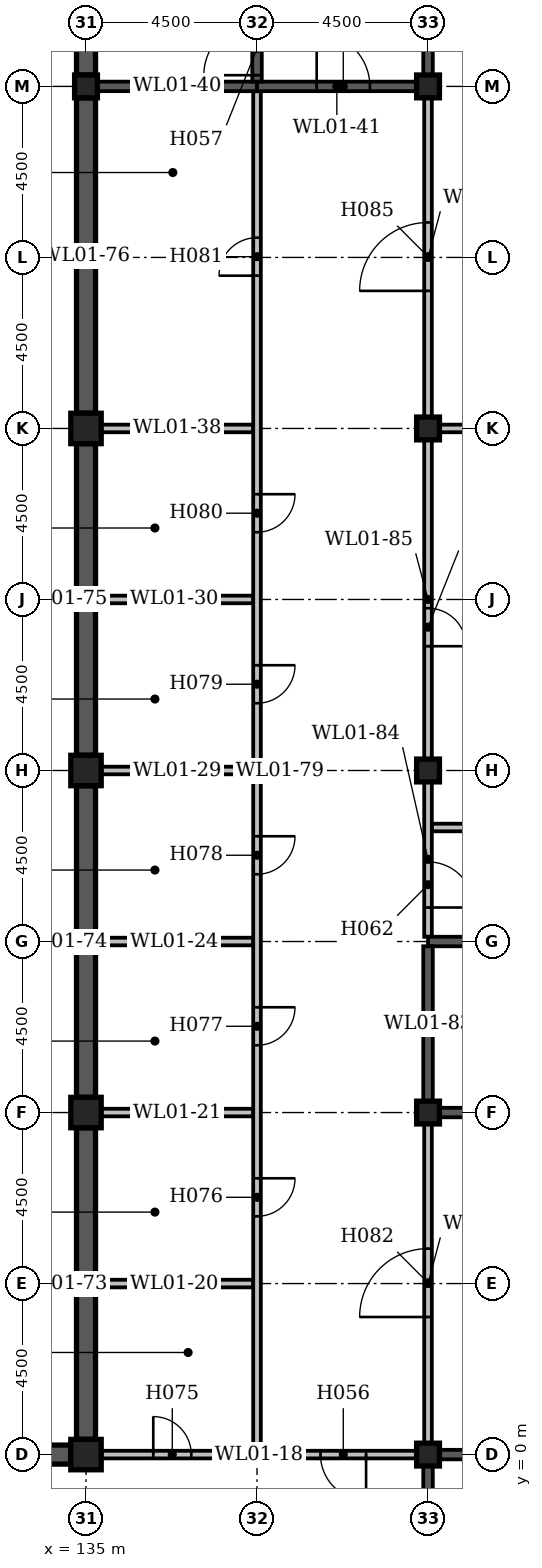
"""IFC4 building model, lengths in metres.
Left out: names, types, materials, properties, quantities, classifications, styles, units other than length and angle.
Written with IfcOpenShell. Run it as: python <this file> out.ifc"""

import sys

from ifc_helpers import new_model, si_unit, direction, frame, frame_2d, origin, origin_2d, place, context, subcontext, project, spatial, rectangle, extrude, element, fill, save


model = new_model("IFC4")
c1 = context("Model", 3, precision=1e-05, world=origin(), true_north=direction((0.0, 1.0)))
c2 = subcontext(c1, "Body", "Model", "MODEL_VIEW")
j1 = project(units=[si_unit("LENGTHUNIT", "METRE"), si_unit("PLANEANGLEUNIT", "RADIAN")], contexts=[c1])
p1 = place(None, origin())
s1 = spatial("IfcSite", under=j1, at=p1, CompositionType="ELEMENT")
p2 = place(p1, origin())
s2 = spatial("IfcBuilding", under=s1, at=p2, CompositionType="ELEMENT")
p3 = place(p2, frame((0.0, 0.0, 9.0)))
s3 = spatial("IfcBuildingStorey", under=s2, at=p3, CompositionType="ELEMENT", Elevation=9.0)
for number, where, z_axis, x_axis in (
    (1, (135.0, 0.0, -0.3), (0.0, 0.0, 1.0), (1.0, 0.0, 0.0)),
    (2, (135.0, 9.0, -0.3), (0.0, 0.0, 1.0), (1.0, 0.0, 0.0)),
    (3, (135.0, 18.0, -0.3), (0.0, 0.0, 1.0), (1.0, 0.0, 0.0)),
    (4, (135.0, 27.0, -0.3), (0.0, 0.0, 1.0), (1.0, 0.0, 0.0)),
):
    element("IfcColumn", number, at=place(p3, frame(where, z_axis=z_axis, x_axis=x_axis)), inside=s3, PredefinedType="COLUMN", context=c2, shape_type="SweptSolid", body=[
        extrude(rectangle(XDim=0.8, YDim=0.8, at=origin_2d()), origin(), (0.0, 0.0, 1.0), 5.0),
    ])
p4 = place(p3, frame((135.0, 36.0, -0.3), z_axis=(0.0, 0.0, 1.0), x_axis=(1.0, 0.0, 0.0)))
e5 = element("IfcColumn", 5, at=p4, inside=s3, PredefinedType="COLUMN", context=c2, shape_type="SweptSolid", body=[
    extrude(rectangle(XDim=0.6, YDim=0.6, at=origin_2d()), origin(), (0.0, 0.0, 1.0), 5.0),
])
for number, where, z_axis, x_axis in (
    (6, (144.0, 0.0, 0.0), (0.0, 0.0, 1.0), (1.0, 0.0, 0.0)),
    (7, (144.0, 9.0, 0.0), (0.0, 0.0, 1.0), (1.0, 0.0, 0.0)),
    (8, (144.0, 18.0, 0.0), (0.0, 0.0, 1.0), (1.0, 0.0, 0.0)),
    (9, (144.0, 27.0, 0.0), (0.0, 0.0, 1.0), (1.0, 0.0, 0.0)),
    (10, (144.0, 36.0, 0.0), (0.0, 0.0, 1.0), (1.0, 0.0, 0.0)),
):
    element("IfcColumn", number, at=place(p3, frame(where, z_axis=z_axis, x_axis=x_axis)), inside=s3, PredefinedType="COLUMN", context=c2, shape_type="SweptSolid", body=[
        extrude(rectangle(XDim=0.6, YDim=0.6, at=origin_2d()), origin(), (0.0, 0.0, 1.0), 4.7),
    ])
p5 = place(p3, frame((126.3, 0.0, 0.0), z_axis=(0.0, 0.0, 1.0), x_axis=(1.0, 0.0, 0.0)))
e11 = element("IfcWall", 11, at=p5, inside=s3, PredefinedType="STANDARD", context=c2, shape_type="SweptSolid", body=[
    extrude(rectangle(XDim=8.3, YDim=0.5, at=frame_2d((4.15, 0.0))), origin(), (0.0, 0.0, 1.0), 5.0),
])
p6 = place(p3, frame((135.4, 0.0, 0.0), z_axis=(0.0, 0.0, 1.0), x_axis=(1.0, 0.0, 0.0)))
e12 = element("IfcWall", 12, at=p6, inside=s3, PredefinedType="STANDARD", context=c2, shape_type="SweptSolid", body=[
    extrude(rectangle(XDim=8.3, YDim=0.2, at=frame_2d((4.15, 0.0))), origin(), (0.0, 0.0, 1.0), 4.7),
])
p7 = place(p6, frame((5.77, 0.0, 0.0)))
e13 = element("IfcOpeningElement", 13, at=p7, cuts=e12, PredefinedType="OPENING", context=c2, shape_type="SweptSolid", body=[
    extrude(rectangle(XDim=1.2, YDim=2.1, at=frame_2d((0.6, 1.05))), frame((0.0, 0.112, 0.0), z_axis=(0.0, -1.0, 0.0), x_axis=(1.0, 0.0, 0.0)), (0.0, 0.0, 1.0), 0.224),
])
p8 = place(p6, frame((1.37, 0.0, 0.0)))
e14 = element("IfcOpeningElement", 14, at=p8, cuts=e12, PredefinedType="OPENING", context=c2, shape_type="SweptSolid", body=[
    extrude(rectangle(XDim=1.0, YDim=2.1, at=frame_2d((0.5, 1.05))), frame((0.0, 0.112, 0.0), z_axis=(0.0, -1.0, 0.0), x_axis=(1.0, 0.0, 0.0)), (0.0, 0.0, 1.0), 0.224),
])
p9 = place(p3, frame((144.3, 0.0, 0.0), z_axis=(0.0, 0.0, 1.0), x_axis=(1.0, 0.0, 0.0)))
e15 = element("IfcWall", 15, at=p9, inside=s3, PredefinedType="STANDARD", context=c2, shape_type="SweptSolid", body=[
    extrude(rectangle(XDim=4.2, YDim=0.25, at=frame_2d((2.1, 0.0))), origin(), (0.0, 0.0, 1.0), 5.0),
])
p10 = place(p3, frame((135.25, 4.5, 0.0), z_axis=(0.0, 0.0, 1.0), x_axis=(1.0, 0.0, 0.0)))
e16 = element("IfcWall", 16, at=p10, inside=s3, PredefinedType="STANDARD", context=c2, shape_type="SweptSolid", body=[
    extrude(rectangle(XDim=4.15, YDim=0.2, at=frame_2d((2.075, 0.0))), origin(), (0.0, 0.0, 1.0), 4.7),
])
p11 = place(p3, frame((135.4, 9.0, 0.0), z_axis=(0.0, 0.0, 1.0), x_axis=(1.0, 0.0, 0.0)))
e17 = element("IfcWall", 17, at=p11, inside=s3, PredefinedType="STANDARD", context=c2, shape_type="SweptSolid", body=[
    extrude(rectangle(XDim=4.0, YDim=0.2, at=frame_2d((2.0, 0.0))), origin(), (0.0, 0.0, 1.0), 4.7),
])
p12 = place(p3, frame((144.3, 9.0, 0.0), z_axis=(0.0, 0.0, 1.0), x_axis=(1.0, 0.0, 0.0)))
e18 = element("IfcWall", 18, at=p12, inside=s3, PredefinedType="STANDARD", context=c2, shape_type="SweptSolid", body=[
    extrude(rectangle(XDim=4.2, YDim=0.25, at=frame_2d((2.1, 0.0))), origin(), (0.0, 0.0, 1.0), 5.0),
])
p13 = place(p3, frame((135.25, 13.5, 0.0), z_axis=(0.0, 0.0, 1.0), x_axis=(1.0, 0.0, 0.0)))
e19 = element("IfcWall", 19, at=p13, inside=s3, PredefinedType="STANDARD", context=c2, shape_type="SweptSolid", body=[
    extrude(rectangle(XDim=4.15, YDim=0.2, at=frame_2d((2.075, 0.0))), origin(), (0.0, 0.0, 1.0), 4.7),
])
p14 = place(p3, frame((144.0, 13.5, 0.0), z_axis=(0.0, 0.0, 1.0), x_axis=(1.0, 0.0, 0.0)))
e20 = element("IfcWall", 20, at=p14, inside=s3, PredefinedType="STANDARD", context=c2, shape_type="SweptSolid", body=[
    extrude(rectangle(XDim=4.5, YDim=0.25, at=frame_2d((2.25, 0.0))), origin(), (0.0, 0.0, 1.0), 5.0),
])
p15 = place(p14, frame((1.72, 0.0, 0.0)))
e21 = element("IfcOpeningElement", 21, at=p15, cuts=e20, PredefinedType="OPENING", context=c2, shape_type="SweptSolid", body=[
    extrude(rectangle(XDim=1.1, YDim=2.1, at=frame_2d((0.55, 1.05))), frame((0.0, 0.137, 0.0), z_axis=(0.0, -1.0, 0.0), x_axis=(1.0, 0.0, 0.0)), (0.0, 0.0, 1.0), 0.274),
])
p16 = place(p3, frame((144.1, 16.5, 0.0), z_axis=(0.0, 0.0, 1.0), x_axis=(1.0, 0.0, 0.0)))
e22 = element("IfcWall", 22, at=p16, inside=s3, PredefinedType="STANDARD", context=c2, shape_type="SweptSolid", body=[
    extrude(rectangle(XDim=8.725, YDim=0.2, at=frame_2d((4.362, 0.0))), origin(), (0.0, 0.0, 1.0), 4.7),
])
p17 = place(p3, frame((135.4, 18.0, 0.0), z_axis=(0.0, 0.0, 1.0), x_axis=(1.0, 0.0, 0.0)))
e23 = element("IfcWall", 23, at=p17, inside=s3, PredefinedType="STANDARD", context=c2, shape_type="SweptSolid", body=[
    extrude(rectangle(XDim=4.0, YDim=0.2, at=frame_2d((2.0, 0.0))), origin(), (0.0, 0.0, 1.0), 4.7),
])
p18 = place(p3, frame((135.25, 22.5, 0.0), z_axis=(0.0, 0.0, 1.0), x_axis=(1.0, 0.0, 0.0)))
e24 = element("IfcWall", 24, at=p18, inside=s3, PredefinedType="STANDARD", context=c2, shape_type="SweptSolid", body=[
    extrude(rectangle(XDim=4.15, YDim=0.2, at=frame_2d((2.075, 0.0))), origin(), (0.0, 0.0, 1.0), 4.7),
])
p19 = place(p3, frame((135.4, 27.0, 0.0), z_axis=(0.0, 0.0, 1.0), x_axis=(1.0, 0.0, 0.0)))
e25 = element("IfcWall", 25, at=p19, inside=s3, PredefinedType="STANDARD", context=c2, shape_type="SweptSolid", body=[
    extrude(rectangle(XDim=4.0, YDim=0.2, at=frame_2d((2.0, 0.0))), origin(), (0.0, 0.0, 1.0), 4.7),
])
p20 = place(p3, frame((144.3, 27.0, 0.0), z_axis=(0.0, 0.0, 1.0), x_axis=(1.0, 0.0, 0.0)))
e26 = element("IfcWall", 26, at=p20, inside=s3, PredefinedType="STANDARD", context=c2, shape_type="SweptSolid", body=[
    extrude(rectangle(XDim=8.4, YDim=0.2, at=frame_2d((4.2, 0.0))), origin(), (0.0, 0.0, 1.0), 4.7),
])
p21 = place(p3, frame((135.3, 36.0, 0.0), z_axis=(0.0, 0.0, 1.0), x_axis=(1.0, 0.0, 0.0)))
e27 = element("IfcWall", 27, at=p21, inside=s3, PredefinedType="STANDARD", context=c2, shape_type="SweptSolid", body=[
    extrude(rectangle(XDim=4.2, YDim=0.25, at=frame_2d((2.1, 0.0))), origin(), (0.0, 0.0, 1.0), 5.0),
])
p22 = place(p3, frame((139.5, 36.0, 0.0), z_axis=(0.0, 0.0, 1.0), x_axis=(1.0, 0.0, 0.0)))
e28 = element("IfcWall", 28, at=p22, inside=s3, PredefinedType="STANDARD", context=c2, shape_type="SweptSolid", body=[
    extrude(rectangle(XDim=4.2, YDim=0.25, at=frame_2d((2.1, 0.0))), origin(), (0.0, 0.0, 1.0), 4.7),
])
p23 = place(p22, frame((1.57, 0.0, 0.0)))
e29 = element("IfcOpeningElement", 29, at=p23, cuts=e28, PredefinedType="OPENING", context=c2, shape_type="SweptSolid", body=[
    extrude(rectangle(XDim=1.4, YDim=2.1, at=frame_2d((0.7, 1.05))), frame((0.0, 0.137, 0.0), z_axis=(0.0, -1.0, 0.0), x_axis=(1.0, 0.0, 0.0)), (0.0, 0.0, 1.0), 0.274),
])
for number, where, z_axis, x_axis in (
    (30, (135.0, 0.4, 0.0), (0.0, 0.0, 1.0), (0.0, 1.0, 0.0)),
    (31, (135.0, 9.4, 0.0), (0.0, 0.0, 1.0), (0.0, 1.0, 0.0)),
    (32, (135.0, 18.4, 0.0), (0.0, 0.0, 1.0), (0.0, 1.0, 0.0)),
):
    element("IfcWall", number, at=place(p3, frame(where, z_axis=z_axis, x_axis=x_axis)), inside=s3, PredefinedType="STANDARD", context=c2, shape_type="SweptSolid", body=[
        extrude(rectangle(XDim=8.2, YDim=0.5, at=frame_2d((4.1, 0.0))), origin(), (0.0, 0.0, 1.0), 5.0),
    ])
for number, where, z_axis, x_axis in (
    (33, (135.0, 27.4, 0.0), (0.0, 0.0, 1.0), (0.0, 1.0, 0.0)),
    (34, (135.0, 36.3, 0.0), (0.0, 0.0, 1.0), (0.0, 1.0, 0.0)),
):
    element("IfcWall", number, at=place(p3, frame(where, z_axis=z_axis, x_axis=x_axis)), inside=s3, PredefinedType="STANDARD", context=c2, shape_type="SweptSolid", body=[
        extrude(rectangle(XDim=8.3, YDim=0.5, at=frame_2d((4.15, 0.0))), origin(), (0.0, 0.0, 1.0), 5.0),
    ])
p24 = place(p3, frame((139.5, 0.1, 0.0), z_axis=(0.0, 0.0, 1.0), x_axis=(0.0, 1.0, 0.0)))
e35 = element("IfcWall", 35, at=p24, inside=s3, PredefinedType="STANDARD", context=c2, shape_type="SweptSolid", body=[
    extrude(rectangle(XDim=35.775, YDim=0.2, at=frame_2d((17.887, 0.0))), origin(), (0.0, 0.0, 1.0), 4.7),
])
p25 = place(p24, frame((6.17, 0.0, 0.0)))
e36 = element("IfcOpeningElement", 36, at=p25, cuts=e35, PredefinedType="OPENING", context=c2, shape_type="SweptSolid", body=[
    extrude(rectangle(XDim=1.0, YDim=2.1, at=frame_2d((0.5, 1.05))), frame((0.0, 0.112, 0.0), z_axis=(0.0, -1.0, 0.0), x_axis=(1.0, 0.0, 0.0)), (0.0, 0.0, 1.0), 0.224),
])
p26 = place(p24, frame((10.67, 0.0, 0.0)))
e37 = element("IfcOpeningElement", 37, at=p26, cuts=e35, PredefinedType="OPENING", context=c2, shape_type="SweptSolid", body=[
    extrude(rectangle(XDim=1.0, YDim=2.1, at=frame_2d((0.5, 1.05))), frame((0.0, 0.112, 0.0), z_axis=(0.0, -1.0, 0.0), x_axis=(1.0, 0.0, 0.0)), (0.0, 0.0, 1.0), 0.224),
])
p27 = place(p24, frame((15.17, 0.0, 0.0)))
e38 = element("IfcOpeningElement", 38, at=p27, cuts=e35, PredefinedType="OPENING", context=c2, shape_type="SweptSolid", body=[
    extrude(rectangle(XDim=1.0, YDim=2.1, at=frame_2d((0.5, 1.05))), frame((0.0, 0.112, 0.0), z_axis=(0.0, -1.0, 0.0), x_axis=(1.0, 0.0, 0.0)), (0.0, 0.0, 1.0), 0.224),
])
p28 = place(p24, frame((19.67, 0.0, 0.0)))
e39 = element("IfcOpeningElement", 39, at=p28, cuts=e35, PredefinedType="OPENING", context=c2, shape_type="SweptSolid", body=[
    extrude(rectangle(XDim=1.0, YDim=2.1, at=frame_2d((0.5, 1.05))), frame((0.0, 0.112, 0.0), z_axis=(0.0, -1.0, 0.0), x_axis=(1.0, 0.0, 0.0)), (0.0, 0.0, 1.0), 0.224),
])
p29 = place(p24, frame((24.17, 0.0, 0.0)))
e40 = element("IfcOpeningElement", 40, at=p29, cuts=e35, PredefinedType="OPENING", context=c2, shape_type="SweptSolid", body=[
    extrude(rectangle(XDim=1.0, YDim=2.1, at=frame_2d((0.5, 1.05))), frame((0.0, 0.112, 0.0), z_axis=(0.0, -1.0, 0.0), x_axis=(1.0, 0.0, 0.0)), (0.0, 0.0, 1.0), 0.224),
])
p30 = place(p24, frame((30.92, 0.0, 0.0)))
e41 = element("IfcOpeningElement", 41, at=p30, cuts=e35, PredefinedType="OPENING", context=c2, shape_type="SweptSolid", body=[
    extrude(rectangle(XDim=1.0, YDim=2.1, at=frame_2d((0.5, 1.05))), frame((0.0, 0.112, 0.0), z_axis=(0.0, -1.0, 0.0), x_axis=(1.0, 0.0, 0.0)), (0.0, 0.0, 1.0), 0.224),
])
p31 = place(p3, frame((139.5, 36.125, 0.0), z_axis=(0.0, 0.0, 1.0), x_axis=(0.0, 1.0, 0.0)))
e42 = element("IfcWall", 42, at=p31, inside=s3, PredefinedType="STANDARD", context=c2, shape_type="SweptSolid", body=[
    extrude(rectangle(XDim=8.7, YDim=0.25, at=frame_2d((4.35, 0.0))), origin(), (0.0, 0.0, 1.0), 5.0),
])
p32 = place(p31, frame((0.17, 0.0, 0.0)))
e43 = element("IfcOpeningElement", 43, at=p32, cuts=e42, PredefinedType="OPENING", context=c2, shape_type="SweptSolid", body=[
    extrude(rectangle(XDim=1.4, YDim=2.1, at=frame_2d((0.7, 1.05))), frame((0.0, 0.137, 0.0), z_axis=(0.0, -1.0, 0.0), x_axis=(1.0, 0.0, 0.0)), (0.0, 0.0, 1.0), 0.274),
])
p33 = place(p3, frame((144.0, -8.7, 0.0), z_axis=(0.0, 0.0, 1.0), x_axis=(0.0, 1.0, 0.0)))
e44 = element("IfcWall", 44, at=p33, inside=s3, PredefinedType="STANDARD", context=c2, shape_type="SweptSolid", body=[
    extrude(rectangle(XDim=8.4, YDim=0.25, at=frame_2d((4.2, 0.0))), origin(), (0.0, 0.0, 1.0), 5.0),
])
p34 = place(p33, frame((0.12, 0.0, 0.0)))
e45 = element("IfcOpeningElement", 45, at=p34, cuts=e44, PredefinedType="OPENING", context=c2, shape_type="SweptSolid", body=[
    extrude(rectangle(XDim=1.2, YDim=2.1, at=frame_2d((0.6, 1.05))), frame((0.0, 0.137, 0.0), z_axis=(0.0, -1.0, 0.0), x_axis=(1.0, 0.0, 0.0)), (0.0, 0.0, 1.0), 0.274),
])
p35 = place(p3, frame((144.0, 0.3, 0.0), z_axis=(0.0, 0.0, 1.0), x_axis=(0.0, 1.0, 0.0)))
e46 = element("IfcWall", 46, at=p35, inside=s3, PredefinedType="STANDARD", context=c2, shape_type="SweptSolid", body=[
    extrude(rectangle(XDim=8.4, YDim=0.2, at=frame_2d((4.2, 0.0))), origin(), (0.0, 0.0, 1.0), 4.7),
])
p36 = place(p35, frame((3.32, 0.0, 0.0)))
e47 = element("IfcOpeningElement", 47, at=p36, cuts=e46, PredefinedType="OPENING", context=c2, shape_type="SweptSolid", body=[
    extrude(rectangle(XDim=1.8, YDim=2.4, at=frame_2d((0.9, 1.2))), frame((0.0, 0.112, 0.0), z_axis=(0.0, -1.0, 0.0), x_axis=(1.0, 0.0, 0.0)), (0.0, 0.0, 1.0), 0.224),
])
p37 = place(p3, frame((144.0, 9.3, 0.0), z_axis=(0.0, 0.0, 1.0), x_axis=(0.0, 1.0, 0.0)))
e48 = element("IfcWall", 48, at=p37, inside=s3, PredefinedType="STANDARD", context=c2, shape_type="SweptSolid", body=[
    extrude(rectangle(XDim=4.075, YDim=0.25, at=frame_2d((2.038, 0.0))), origin(), (0.0, 0.0, 1.0), 5.0),
])
p38 = place(p3, frame((144.0, 13.625, 0.0), z_axis=(0.0, 0.0, 1.0), x_axis=(0.0, 1.0, 0.0)))
e49 = element("IfcWall", 49, at=p38, inside=s3, PredefinedType="STANDARD", context=c2, shape_type="SweptSolid", body=[
    extrude(rectangle(XDim=4.075, YDim=0.2, at=frame_2d((2.038, 0.0))), origin(), (0.0, 0.0, 1.0), 4.7),
])
p39 = place(p38, frame((0.77, 0.0, 0.0)))
e50 = element("IfcOpeningElement", 50, at=p39, cuts=e49, PredefinedType="OPENING", context=c2, shape_type="SweptSolid", body=[
    extrude(rectangle(XDim=1.2, YDim=2.1, at=frame_2d((0.6, 1.05))), frame((0.0, 0.112, 0.0), z_axis=(0.0, -1.0, 0.0), x_axis=(1.0, 0.0, 0.0)), (0.0, 0.0, 1.0), 0.224),
])
p40 = place(p3, frame((144.0, 18.3, 0.0), z_axis=(0.0, 0.0, 1.0), x_axis=(0.0, 1.0, 0.0)))
e51 = element("IfcWall", 51, at=p40, inside=s3, PredefinedType="STANDARD", context=c2, shape_type="SweptSolid", body=[
    extrude(rectangle(XDim=8.4, YDim=0.2, at=frame_2d((4.2, 0.0))), origin(), (0.0, 0.0, 1.0), 4.7),
])
p41 = place(p40, frame((2.97, 0.0, 0.0)))
e52 = element("IfcOpeningElement", 52, at=p41, cuts=e51, PredefinedType="OPENING", context=c2, shape_type="SweptSolid", body=[
    extrude(rectangle(XDim=1.0, YDim=2.1, at=frame_2d((0.5, 1.05))), frame((0.0, 0.112, 0.0), z_axis=(0.0, -1.0, 0.0), x_axis=(1.0, 0.0, 0.0)), (0.0, 0.0, 1.0), 0.224),
])
p42 = place(p3, frame((144.0, 27.3, 0.0), z_axis=(0.0, 0.0, 1.0), x_axis=(0.0, 1.0, 0.0)))
e53 = element("IfcWall", 53, at=p42, inside=s3, PredefinedType="STANDARD", context=c2, shape_type="SweptSolid", body=[
    extrude(rectangle(XDim=8.4, YDim=0.2, at=frame_2d((4.2, 0.0))), origin(), (0.0, 0.0, 1.0), 4.7),
])
p43 = place(p42, frame((3.32, 0.0, 0.0)))
e54 = element("IfcOpeningElement", 54, at=p43, cuts=e53, PredefinedType="OPENING", context=c2, shape_type="SweptSolid", body=[
    extrude(rectangle(XDim=1.8, YDim=2.4, at=frame_2d((0.9, 1.2))), frame((0.0, 0.112, 0.0), z_axis=(0.0, -1.0, 0.0), x_axis=(1.0, 0.0, 0.0)), (0.0, 0.0, 1.0), 0.224),
])
p44 = place(p3, frame((144.0, 36.3, 0.0), z_axis=(0.0, 0.0, 1.0), x_axis=(0.0, 1.0, 0.0)))
e55 = element("IfcWall", 55, at=p44, inside=s3, PredefinedType="STANDARD", context=c2, shape_type="SweptSolid", body=[
    extrude(rectangle(XDim=8.4, YDim=0.25, at=frame_2d((4.2, 0.0))), origin(), (0.0, 0.0, 1.0), 4.7),
])
p45 = place(p7, origin())
e56 = element("IfcDoor", 56, at=p45, inside=s3, OperationType="SINGLE_SWING_RIGHT", PredefinedType="DOOR", context=c2, shape_type="SweptSolid", body=[
    extrude(rectangle(XDim=1.2, YDim=2.1, at=frame_2d((0.6, 1.05))), frame((0.0, 0.025, 0.0), z_axis=(0.0, -1.0, 0.0), x_axis=(1.0, 0.0, 0.0)), (0.0, 0.0, 1.0), 0.05),
])
fill(e13, e56)
p46 = place(p32, origin())
e57 = element("IfcDoor", 57, at=p46, inside=s3, OperationType="DOUBLE_DOOR_SINGLE_SWING", PredefinedType="DOOR", context=c2, shape_type="SweptSolid", body=[
    extrude(rectangle(XDim=1.4, YDim=2.1, at=frame_2d((0.7, 1.05))), frame((0.0, 0.025, 0.0), z_axis=(0.0, -1.0, 0.0), x_axis=(1.0, 0.0, 0.0)), (0.0, 0.0, 1.0), 0.05),
])
fill(e43, e57)
p47 = place(p23, origin())
e58 = element("IfcDoor", 58, at=p47, inside=s3, OperationType="DOUBLE_DOOR_SINGLE_SWING", PredefinedType="DOOR", context=c2, shape_type="SweptSolid", body=[
    extrude(rectangle(XDim=1.4, YDim=2.1, at=frame_2d((0.7, 1.05))), frame((0.0, 0.025, 0.0), z_axis=(0.0, -1.0, 0.0), x_axis=(1.0, 0.0, 0.0)), (0.0, 0.0, 1.0), 0.05),
])
fill(e29, e58)
p48 = place(p39, frame((1.2, 0.0, 0.0), z_axis=(0.0, 0.0, 1.0), x_axis=(-1.0, 0.0, 0.0)))
e59 = element("IfcDoor", 59, at=p48, inside=s3, OperationType="SINGLE_SWING_RIGHT", PredefinedType="DOOR", context=c2, shape_type="SweptSolid", body=[
    extrude(rectangle(XDim=1.2, YDim=2.1, at=frame_2d((0.6, 1.05))), frame((0.0, 0.025, 0.0), z_axis=(0.0, -1.0, 0.0), x_axis=(1.0, 0.0, 0.0)), (0.0, 0.0, 1.0), 0.05),
])
fill(e50, e59)
p49 = place(p8, origin())
e60 = element("IfcDoor", 60, at=p49, inside=s3, OperationType="SINGLE_SWING_LEFT", PredefinedType="DOOR", context=c2, shape_type="SweptSolid", body=[
    extrude(rectangle(XDim=1.0, YDim=2.1, at=frame_2d((0.5, 1.05))), frame((0.0, 0.025, 0.0), z_axis=(0.0, -1.0, 0.0), x_axis=(1.0, 0.0, 0.0)), (0.0, 0.0, 1.0), 0.05),
])
fill(e14, e60)
p50 = place(p25, origin())
e61 = element("IfcDoor", 61, at=p50, inside=s3, OperationType="SINGLE_SWING_RIGHT", PredefinedType="DOOR", context=c2, shape_type="SweptSolid", body=[
    extrude(rectangle(XDim=1.0, YDim=2.1, at=frame_2d((0.5, 1.05))), frame((0.0, 0.025, 0.0), z_axis=(0.0, -1.0, 0.0), x_axis=(1.0, 0.0, 0.0)), (0.0, 0.0, 1.0), 0.05),
])
fill(e36, e61)
p51 = place(p26, origin())
e62 = element("IfcDoor", 62, at=p51, inside=s3, OperationType="SINGLE_SWING_RIGHT", PredefinedType="DOOR", context=c2, shape_type="SweptSolid", body=[
    extrude(rectangle(XDim=1.0, YDim=2.1, at=frame_2d((0.5, 1.05))), frame((0.0, 0.025, 0.0), z_axis=(0.0, -1.0, 0.0), x_axis=(1.0, 0.0, 0.0)), (0.0, 0.0, 1.0), 0.05),
])
fill(e37, e62)
p52 = place(p27, origin())
e63 = element("IfcDoor", 63, at=p52, inside=s3, OperationType="SINGLE_SWING_RIGHT", PredefinedType="DOOR", context=c2, shape_type="SweptSolid", body=[
    extrude(rectangle(XDim=1.0, YDim=2.1, at=frame_2d((0.5, 1.05))), frame((0.0, 0.025, 0.0), z_axis=(0.0, -1.0, 0.0), x_axis=(1.0, 0.0, 0.0)), (0.0, 0.0, 1.0), 0.05),
])
fill(e38, e63)
p53 = place(p28, origin())
e64 = element("IfcDoor", 64, at=p53, inside=s3, OperationType="SINGLE_SWING_RIGHT", PredefinedType="DOOR", context=c2, shape_type="SweptSolid", body=[
    extrude(rectangle(XDim=1.0, YDim=2.1, at=frame_2d((0.5, 1.05))), frame((0.0, 0.025, 0.0), z_axis=(0.0, -1.0, 0.0), x_axis=(1.0, 0.0, 0.0)), (0.0, 0.0, 1.0), 0.05),
])
fill(e39, e64)
p54 = place(p29, origin())
e65 = element("IfcDoor", 65, at=p54, inside=s3, OperationType="SINGLE_SWING_RIGHT", PredefinedType="DOOR", context=c2, shape_type="SweptSolid", body=[
    extrude(rectangle(XDim=1.0, YDim=2.1, at=frame_2d((0.5, 1.05))), frame((0.0, 0.025, 0.0), z_axis=(0.0, -1.0, 0.0), x_axis=(1.0, 0.0, 0.0)), (0.0, 0.0, 1.0), 0.05),
])
fill(e40, e65)
p55 = place(p30, origin())
e66 = element("IfcDoor", 66, at=p55, inside=s3, OperationType="SINGLE_SWING_LEFT", PredefinedType="DOOR", context=c2, shape_type="SweptSolid", body=[
    extrude(rectangle(XDim=1.0, YDim=2.1, at=frame_2d((0.5, 1.05))), frame((0.0, 0.025, 0.0), z_axis=(0.0, -1.0, 0.0), x_axis=(1.0, 0.0, 0.0)), (0.0, 0.0, 1.0), 0.05),
])
fill(e41, e66)
p56 = place(p36, origin())
e67 = element("IfcDoor", 67, at=p56, inside=s3, OperationType="DOUBLE_DOOR_SINGLE_SWING", PredefinedType="DOOR", context=c2, shape_type="SweptSolid", body=[
    extrude(rectangle(XDim=1.8, YDim=2.4, at=frame_2d((0.9, 1.2))), frame((0.0, 0.025, 0.0), z_axis=(0.0, -1.0, 0.0), x_axis=(1.0, 0.0, 0.0)), (0.0, 0.0, 1.0), 0.05),
])
fill(e47, e67)
p57 = place(p41, frame((1.0, 0.0, 0.0), z_axis=(0.0, 0.0, 1.0), x_axis=(-1.0, 0.0, 0.0)))
e68 = element("IfcDoor", 68, at=p57, inside=s3, OperationType="SINGLE_SWING_RIGHT", PredefinedType="DOOR", context=c2, shape_type="SweptSolid", body=[
    extrude(rectangle(XDim=1.0, YDim=2.1, at=frame_2d((0.5, 1.05))), frame((0.0, 0.025, 0.0), z_axis=(0.0, -1.0, 0.0), x_axis=(1.0, 0.0, 0.0)), (0.0, 0.0, 1.0), 0.05),
])
fill(e52, e68)
p58 = place(p43, origin())
e69 = element("IfcDoor", 69, at=p58, inside=s3, OperationType="DOUBLE_DOOR_SINGLE_SWING", PredefinedType="DOOR", context=c2, shape_type="SweptSolid", body=[
    extrude(rectangle(XDim=1.8, YDim=2.4, at=frame_2d((0.9, 1.2))), frame((0.0, 0.025, 0.0), z_axis=(0.0, -1.0, 0.0), x_axis=(1.0, 0.0, 0.0)), (0.0, 0.0, 1.0), 0.05),
])
fill(e54, e69)
save(model, sys.argv[1])
